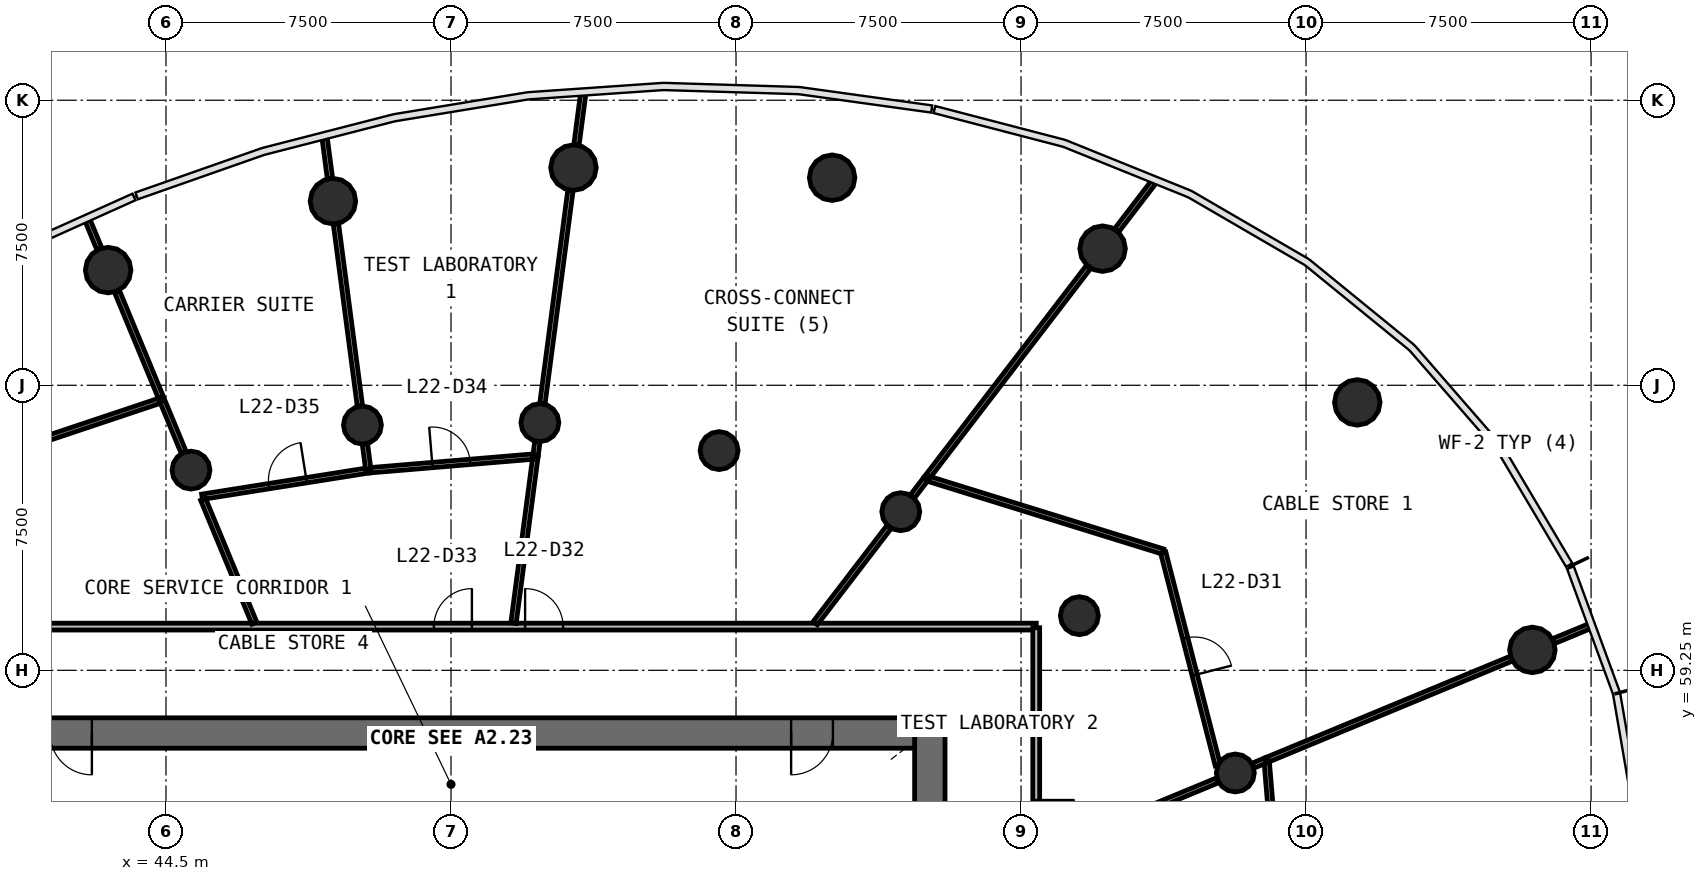
"""IFC4 building model, lengths in metres.
Left out: names, types, materials, properties, quantities, classifications, styles, units other than length and angle.
Written with IfcOpenShell. Run it as: python <this file> out.ifc"""

import sys

from ifc_helpers import new_model, si_unit, direction, frame, frame_2d, origin, origin_2d, place, context, subcontext, project, spatial, rectangle, circle, extrude, source, transform, mapped, element, fill, save


model = new_model("IFC4")
c1 = context("Model", 3, precision=1e-05, world=origin(), true_north=direction((0.0, 1.0)))
c2 = subcontext(c1, "Body", "Model", "MODEL_VIEW")
j1 = project(units=[si_unit("LENGTHUNIT", "METRE"), si_unit("PLANEANGLEUNIT", "RADIAN")], contexts=[c1])
p1 = place(None, origin())
s1 = spatial("IfcSite", under=j1, at=p1, CompositionType="ELEMENT")
p2 = place(p1, origin())
s2 = spatial("IfcBuilding", under=s1, at=p2, CompositionType="ELEMENT")
p3 = place(p2, frame((0.0, 0.0, 96.2)))
s3 = spatial("IfcBuildingStorey", under=s2, at=p3, CompositionType="ELEMENT", Elevation=96.2)
p4 = place(p3, frame((64.6, 38.0, 0.0), z_axis=(0.0, 0.0, 1.0), x_axis=(0.0, 1.0, 0.0)))
e1 = element("IfcWall", 1, at=p4, inside=s3, PredefinedType="SHEAR", context=c2, shape_type="SweptSolid", body=[
    extrude(rectangle(XDim=20.0, YDim=0.8, at=frame_2d((10.0, 0.0))), origin(), (0.0, 0.0, 1.0), 4.1),
])
p5 = place(p4, frame((9.1, 0.0, 0.0)))
e2 = element("IfcOpeningElement", 2, at=p5, cuts=e1, PredefinedType="OPENING", context=c2, shape_type="SweptSolid", body=[
    extrude(rectangle(XDim=1.8, YDim=2.1, at=frame_2d((0.9, 1.05))), frame((0.0, 0.41, 0.0), z_axis=(0.0, -1.0, 0.0), x_axis=(1.0, 0.0, 0.0)), (0.0, 0.0, 1.0), 0.82),
])
p6 = place(p3, frame((64.2, 57.6, 0.0), z_axis=(0.0, 0.0, 1.0), x_axis=(-1.0, 0.0, 0.0)))
e3 = element("IfcWall", 3, at=p6, inside=s3, PredefinedType="SHEAR", context=c2, shape_type="SweptSolid", body=[
    extrude(rectangle(XDim=24.4, YDim=0.8, at=frame_2d((12.2, 0.0))), origin(), (0.0, 0.0, 1.0), 4.1),
])
p7 = place(p6, frame((21.65, 0.0, 0.0)))
e4 = element("IfcOpeningElement", 4, at=p7, cuts=e3, PredefinedType="OPENING", context=c2, shape_type="SweptSolid", body=[
    extrude(rectangle(XDim=1.1, YDim=2.1, at=frame_2d((0.55, 1.05))), frame((0.0, 0.41, 0.0), z_axis=(0.0, -1.0, 0.0), x_axis=(1.0, 0.0, 0.0)), (0.0, 0.0, 1.0), 0.82),
])
p8 = place(p6, frame((2.15, 0.0, 0.0)))
e5 = element("IfcOpeningElement", 5, at=p8, cuts=e3, PredefinedType="OPENING", context=c2, shape_type="SweptSolid", body=[
    extrude(rectangle(XDim=1.1, YDim=2.1, at=frame_2d((0.55, 1.05))), frame((0.0, 0.41, 0.0), z_axis=(0.0, -1.0, 0.0), x_axis=(1.0, 0.0, 0.0)), (0.0, 0.0, 1.0), 0.82),
])
m1 = source(origin(), c2, "Body", "SweptSolid", [
    extrude(circle(Radius=0.6, at=origin_2d()), origin(), (0.0, 0.0, 1.0), 4.1),
])
for number, where, z_axis, x_axis in (
    (6, (80.456, 59.787, 0.0), (0.0, 0.0, 1.0), (1.0, 0.0, 0.0)),
    (7, (75.848, 66.299, 0.0), (0.0, 0.0, 1.0), (1.0, 0.0, 0.0)),
    (8, (69.146, 70.345, 0.0), (0.0, 0.0, 1.0), (1.0, 0.0, 0.0)),
    (9, (62.029, 72.212, 0.0), (0.0, 0.0, 1.0), (1.0, 0.0, 0.0)),
    (10, (55.222, 72.477, 0.0), (0.0, 0.0, 1.0), (1.0, 0.0, 0.0)),
    (11, (48.894, 71.595, 0.0), (0.0, 0.0, 1.0), (1.0, 0.0, 0.0)),
    (12, (42.978, 69.781, 0.0), (0.0, 0.0, 1.0), (1.0, 0.0, 0.0)),
):
    element("IfcColumn", number, at=place(p3, frame(where, z_axis=z_axis, x_axis=x_axis)), inside=s3, PredefinedType="COLUMN", context=c2, shape_type="MappedRepresentation", body=[
        mapped(m1, transform((0.0, 0.0, 0.0), scale=1.0)),
    ])
m2 = source(origin(), c2, "Body", "SweptSolid", [
    extrude(circle(Radius=0.5, at=origin_2d()), origin(), (0.0, 0.0, 1.0), 4.1),
])
for number, where, z_axis, x_axis in (
    (13, (72.639, 56.549, 0.0), (0.0, 0.0, 1.0), (1.0, 0.0, 0.0)),
    (14, (68.535, 60.688, 0.0), (0.0, 0.0, 1.0), (1.0, 0.0, 0.0)),
    (15, (63.835, 63.424, 0.0), (0.0, 0.0, 1.0), (1.0, 0.0, 0.0)),
    (16, (59.055, 65.031, 0.0), (0.0, 0.0, 1.0), (1.0, 0.0, 0.0)),
    (17, (54.339, 65.767, 0.0), (0.0, 0.0, 1.0), (1.0, 0.0, 0.0)),
    (18, (49.669, 65.703, 0.0), (0.0, 0.0, 1.0), (1.0, 0.0, 0.0)),
    (19, (45.158, 64.518, 0.0), (0.0, 0.0, 1.0), (1.0, 0.0, 0.0)),
):
    element("IfcColumn", number, at=place(p3, frame(where, z_axis=z_axis, x_axis=x_axis)), inside=s3, PredefinedType="COLUMN", context=c2, shape_type="MappedRepresentation", body=[
        mapped(m2, transform((0.0, 0.0, 0.0), scale=1.0)),
    ])
p9 = place(p3, frame((36.6, 60.4, 0.0), z_axis=(0.0, 0.0, 1.0), x_axis=(1.0, 0.0, 0.0)))
e20 = element("IfcWall", 20, at=p9, inside=s3, PredefinedType="PARTITIONING", context=c2, shape_type="SweptSolid", body=[
    extrude(rectangle(XDim=30.8, YDim=0.18, at=frame_2d((15.4, 0.0))), origin(), (0.0, 0.0, 1.0), 2.9),
])
p10 = place(p9, frame((17.35, 0.0, 0.0)))
e21 = element("IfcOpeningElement", 21, at=p10, cuts=e20, PredefinedType="OPENING", context=c2, shape_type="SweptSolid", body=[
    extrude(rectangle(XDim=1.0, YDim=2.1, at=frame_2d((0.5, 1.05))), frame((0.0, 0.1, 0.0), z_axis=(0.0, -1.0, 0.0), x_axis=(1.0, 0.0, 0.0)), (0.0, 0.0, 1.0), 0.2),
])
p11 = place(p9, frame((14.95, 0.0, 0.0)))
e22 = element("IfcOpeningElement", 22, at=p11, cuts=e20, PredefinedType="OPENING", context=c2, shape_type="SweptSolid", body=[
    extrude(rectangle(XDim=1.0, YDim=2.1, at=frame_2d((0.5, 1.05))), frame((0.0, 0.1, 0.0), z_axis=(0.0, -1.0, 0.0), x_axis=(1.0, 0.0, 0.0)), (0.0, 0.0, 1.0), 0.2),
])
p12 = place(p3, frame((67.4, 60.37, 0.0), z_axis=(0.0, 0.0, 1.0), x_axis=(0.0, -1.0, 0.0)))
e23 = element("IfcWall", 23, at=p12, inside=s3, PredefinedType="PARTITIONING", context=c2, shape_type="SweptSolid", body=[
    extrude(rectangle(XDim=23.583, YDim=0.18, at=frame_2d((11.791, 0.0))), origin(), (0.0, 0.0, 1.0), 2.9),
])
p13 = place(p12, frame((11.333, 0.0, 0.0)))
e24 = element("IfcOpeningElement", 24, at=p13, cuts=e23, PredefinedType="OPENING", context=c2, shape_type="SweptSolid", body=[
    extrude(rectangle(XDim=1.0, YDim=2.1, at=frame_2d((0.5, 1.05))), frame((0.0, 0.1, 0.0), z_axis=(0.0, -1.0, 0.0), x_axis=(1.0, 0.0, 0.0)), (0.0, 0.0, 1.0), 0.2),
])
p14 = place(p12, frame((4.532, 0.0, 0.0)))
e25 = element("IfcOpeningElement", 25, at=p14, cuts=e23, PredefinedType="OPENING", context=c2, shape_type="SweptSolid", body=[
    extrude(rectangle(XDim=1.0, YDim=2.1, at=frame_2d((0.5, 1.05))), frame((0.0, 0.1, 0.0), z_axis=(0.0, -1.0, 0.0), x_axis=(1.0, 0.0, 0.0)), (0.0, 0.0, 1.0), 0.2),
])
p15 = place(p3, frame((64.511, 64.305, 0.0), z_axis=(0.0, 0.0, 1.0), x_axis=(0.608747408716, 0.793364098244, 0.0)))
e26 = element("IfcWall", 26, at=p15, inside=s3, PredefinedType="PARTITIONING", context=c2, shape_type="SweptSolid", body=[
    extrude(rectangle(XDim=7.009, YDim=0.14, at=frame_2d((3.504, 0.0))), origin(), (0.0, 0.0, 1.0), 2.9),
])
p16 = place(p3, frame((73.461, 56.889, 0.0), z_axis=(0.0, 0.0, 1.0), x_axis=(0.923875437127, 0.382693319347, 0.0)))
e27 = element("IfcWall", 27, at=p16, inside=s3, PredefinedType="PARTITIONING", context=c2, shape_type="SweptSolid", body=[
    extrude(rectangle(XDim=6.966, YDim=0.14, at=frame_2d((3.483, 0.0))), origin(), (0.0, 0.0, 1.0), 2.9),
])
p17 = place(p3, frame((70.735, 62.375, 0.0), z_axis=(0.0, 0.0, 1.0), x_axis=(-0.955154002862, 0.296109491264, 0.0)))
e28 = element("IfcWall", 28, at=p17, inside=s3, PredefinedType="PARTITIONING", context=c2, shape_type="SweptSolid", body=[
    extrude(rectangle(XDim=6.441, YDim=0.14, at=frame_2d((3.22, 0.0))), origin(), (0.0, 0.0, 1.0), 2.9),
])
p18 = place(p3, frame((73.966, 50.892, 0.0), z_axis=(0.0, 0.0, 1.0), x_axis=(-0.083895623438, 0.996474547777, 0.0)))
e29 = element("IfcWall", 29, at=p18, inside=s3, PredefinedType="PARTITIONING", context=c2, shape_type="SweptSolid", body=[
    extrude(rectangle(XDim=5.989, YDim=0.14, at=frame_2d((2.994, 0.0))), origin(), (0.0, 0.0, 1.0), 2.9),
])
p19 = place(p3, frame((70.742, 62.346, 0.0), z_axis=(0.0, 0.0, 1.0), x_axis=(0.248578766965, -0.968611685153, 0.0)))
e30 = element("IfcWall", 30, at=p19, inside=s3, PredefinedType="PARTITIONING", context=c2, shape_type="SweptSolid", body=[
    extrude(rectangle(XDim=5.775, YDim=0.14, at=frame_2d((2.887, 0.0))), origin(), (0.0, 0.0, 1.0), 2.9),
])
p20 = place(p19, frame((2.325, 0.0, 0.0)))
e31 = element("IfcOpeningElement", 31, at=p20, cuts=e30, PredefinedType="OPENING", context=c2, shape_type="SweptSolid", body=[
    extrude(rectangle(XDim=1.0, YDim=2.1, at=frame_2d((0.5, 1.05))), frame((0.0, 0.08, 0.0), z_axis=(0.0, -1.0, 0.0), x_axis=(1.0, 0.0, 0.0)), (0.0, 0.0, 1.0), 0.16),
])
p21 = place(p3, frame((54.405, 66.267, 0.0), z_axis=(0.0, 0.0, 1.0), x_axis=(0.130510314557, 0.991446951578, 0.0)))
e32 = element("IfcWall", 32, at=p21, inside=s3, PredefinedType="PARTITIONING", context=c2, shape_type="SweptSolid", body=[
    extrude(rectangle(XDim=5.659, YDim=0.14, at=frame_2d((2.829, 0.0))), origin(), (0.0, 0.0, 1.0), 2.9),
])
p22 = place(p3, frame((44.394, 66.363, 0.0), z_axis=(0.0, 0.0, 1.0), x_axis=(-0.948344350496, -0.317242797999, 0.0)))
e33 = element("IfcWall", 33, at=p22, inside=s3, PredefinedType="PARTITIONING", context=c2, shape_type="SweptSolid", body=[
    extrude(rectangle(XDim=5.411, YDim=0.14, at=frame_2d((2.706, 0.0))), origin(), (0.0, 0.0, 1.0), 2.9),
])
p23 = place(p3, frame((67.49, 54.416, 0.0), z_axis=(0.0, 0.0, 1.0), x_axis=(0.923890025086, 0.382658100067, 0.0)))
e34 = element("IfcWall", 34, at=p23, inside=s3, PredefinedType="PARTITIONING", context=c2, shape_type="SweptSolid", body=[
    extrude(rectangle(XDim=5.068, YDim=0.14, at=frame_2d((2.534, 0.0))), origin(), (0.0, 0.0, 1.0), 2.9),
])
p24 = place(p3, frame((49.604, 66.203, 0.0), z_axis=(0.0, 0.0, 1.0), x_axis=(-0.130552494248, 0.991441398291, 0.0)))
e35 = element("IfcWall", 35, at=p24, inside=s3, PredefinedType="PARTITIONING", context=c2, shape_type="SweptSolid", body=[
    extrude(rectangle(XDim=4.834, YDim=0.14, at=frame_2d((2.417, 0.0))), origin(), (0.0, 0.0, 1.0), 2.9),
])
p25 = place(p3, frame((53.644, 60.49, 0.0), z_axis=(0.0, 0.0, 1.0), x_axis=(0.130541536681, 0.991442841116, 0.0)))
e36 = element("IfcWall", 36, at=p25, inside=s3, PredefinedType="PARTITIONING", context=c2, shape_type="SweptSolid", body=[
    extrude(rectangle(XDim=4.427, YDim=0.14, at=frame_2d((2.213, 0.0))), origin(), (0.0, 0.0, 1.0), 2.9),
])
p26 = place(p3, frame((45.448, 63.816, 0.0), z_axis=(0.0, 0.0, 1.0), x_axis=(0.987681104019, 0.156480148144, 0.0)))
e37 = element("IfcWall", 37, at=p26, inside=s3, PredefinedType="PARTITIONING", context=c2, shape_type="SweptSolid", body=[
    extrude(rectangle(XDim=4.433, YDim=0.14, at=frame_2d((2.216, 0.0))), origin(), (0.0, 0.0, 1.0), 2.9),
])
p27 = place(p26, frame((1.782, 0.0, 0.0)))
e38 = element("IfcOpeningElement", 38, at=p27, cuts=e37, PredefinedType="OPENING", context=c2, shape_type="SweptSolid", body=[
    extrude(rectangle(XDim=1.0, YDim=2.1, at=frame_2d((0.5, 1.05))), frame((0.0, 0.08, 0.0), z_axis=(0.0, -1.0, 0.0), x_axis=(1.0, 0.0, 0.0)), (0.0, 0.0, 1.0), 0.16),
])
p28 = place(p3, frame((49.856, 64.513, 0.0), z_axis=(0.0, 0.0, 1.0), x_axis=(0.996498324855, 0.083612729662, 0.0)))
e39 = element("IfcWall", 39, at=p28, inside=s3, PredefinedType="PARTITIONING", context=c2, shape_type="SweptSolid", body=[
    extrude(rectangle(XDim=4.31, YDim=0.14, at=frame_2d((2.155, 0.0))), origin(), (0.0, 0.0, 1.0), 2.9),
])
p29 = place(p28, frame((1.66, 0.0, 0.0)))
e40 = element("IfcOpeningElement", 40, at=p29, cuts=e39, PredefinedType="OPENING", context=c2, shape_type="SweptSolid", body=[
    extrude(rectangle(XDim=1.0, YDim=2.1, at=frame_2d((0.5, 1.05))), frame((0.0, 0.08, 0.0), z_axis=(0.0, -1.0, 0.0), x_axis=(1.0, 0.0, 0.0)), (0.0, 0.0, 1.0), 0.16),
])
p30 = place(p3, frame((46.826, 60.49, 0.0), z_axis=(0.0, 0.0, 1.0), x_axis=(-0.382624745771, 0.923903839111, 0.0)))
e41 = element("IfcWall", 41, at=p30, inside=s3, PredefinedType="PARTITIONING", context=c2, shape_type="SweptSolid", body=[
    extrude(rectangle(XDim=3.529, YDim=0.14, at=frame_2d((1.764, 0.0))), origin(), (0.0, 0.0, 1.0), 2.9),
])
p31 = place(p3, frame((61.584, 60.49, 0.0), z_axis=(0.0, 0.0, 1.0), x_axis=(0.60874605662, 0.793365135703, 0.0)))
e42 = element("IfcWall", 42, at=p31, inside=s3, PredefinedType="PARTITIONING", context=c2, shape_type="SweptSolid", body=[
    extrude(rectangle(XDim=3.194, YDim=0.14, at=frame_2d((1.597, 0.0))), origin(), (0.0, 0.0, 1.0), 2.9),
])
p32 = place(p3, frame((44.367, 66.428, 0.0), z_axis=(0.0, 0.0, 1.0), x_axis=(-0.382653687311, 0.923891852755, 0.0)))
e43 = element("IfcWall", 43, at=p32, inside=s3, PredefinedType="PARTITIONING", context=c2, shape_type="SweptSolid", body=[
    extrude(rectangle(XDim=3.024, YDim=0.14, at=frame_2d((1.512, 0.0))), origin(), (0.0, 0.0, 1.0), 2.9),
])
p33 = place(p3, frame((69.514, 70.824, 0.0), z_axis=(0.0, 0.0, 1.0), x_axis=(0.608843265378, 0.79329053833, 0.0)))
e44 = element("IfcWall", 44, at=p33, inside=s3, PredefinedType="PARTITIONING", context=c2, shape_type="SweptSolid", body=[
    extrude(rectangle(XDim=1.605, YDim=0.14, at=frame_2d((0.803, 0.0))), origin(), (0.0, 0.0, 1.0), 2.9),
])
p34 = place(p3, frame((44.965, 64.984, 0.0), z_axis=(0.0, 0.0, 1.0), x_axis=(-0.382813576456, 0.923825614324, 0.0)))
e45 = element("IfcWall", 45, at=p34, inside=s3, PredefinedType="PARTITIONING", context=c2, shape_type="SweptSolid", body=[
    extrude(rectangle(XDim=1.463, YDim=0.14, at=frame_2d((0.731, 0.0))), origin(), (0.0, 0.0, 1.0), 2.9),
])
p35 = place(p3, frame((55.301, 73.076, 0.0), z_axis=(0.0, 0.0, 1.0), x_axis=(0.130459252334, 0.991453671878, 0.0)))
e46 = element("IfcWall", 46, at=p35, inside=s3, PredefinedType="PARTITIONING", context=c2, shape_type="SweptSolid", body=[
    extrude(rectangle(XDim=1.333, YDim=0.14, at=frame_2d((0.666, 0.0))), origin(), (0.0, 0.0, 1.0), 2.9),
])
p36 = place(p3, frame((48.815, 72.195, 0.0), z_axis=(0.0, 0.0, 1.0), x_axis=(-0.130532066482, 0.991444087995, 0.0)))
e47 = element("IfcWall", 47, at=p36, inside=s3, PredefinedType="PARTITIONING", context=c2, shape_type="SweptSolid", body=[
    extrude(rectangle(XDim=1.059, YDim=0.14, at=frame_2d((0.529, 0.0))), origin(), (0.0, 0.0, 1.0), 2.9),
])
p37 = place(p3, frame((81.014, 60.018, 0.0), z_axis=(0.0, 0.0, 1.0), x_axis=(0.923912211219, 0.382604529457, 0.0)))
e48 = element("IfcWall", 48, at=p37, inside=s3, PredefinedType="PARTITIONING", context=c2, shape_type="SweptSolid", body=[
    extrude(rectangle(XDim=1.052, YDim=0.14, at=frame_2d((0.526, 0.0))), origin(), (0.0, 0.0, 1.0), 2.9),
])
p38 = place(p3, frame((42.747, 70.34, 0.0), z_axis=(0.0, 0.0, 1.0), x_axis=(-0.382766463222, 0.923845135633, 0.0)))
e49 = element("IfcWall", 49, at=p38, inside=s3, PredefinedType="PARTITIONING", context=c2, shape_type="SweptSolid", body=[
    extrude(rectangle(XDim=0.797, YDim=0.14, at=frame_2d((0.399, 0.0))), origin(), (0.0, 0.0, 1.0), 2.9),
])
p39 = place(p3, frame((49.823, 64.54, 0.0), z_axis=(0.0, 0.0, 1.0), x_axis=(-0.13063385496, 0.991430681358, 0.0)))
e50 = element("IfcWall", 50, at=p39, inside=s3, PredefinedType="PARTITIONING", context=c2, shape_type="SweptSolid", body=[
    extrude(rectangle(XDim=0.669, YDim=0.14, at=frame_2d((0.334, 0.0))), origin(), (0.0, 0.0, 1.0), 2.9),
])
p40 = place(p3, frame((64.142, 63.824, 0.0), z_axis=(0.0, 0.0, 1.0), x_axis=(0.608911807211, 0.793237928392, 0.0)))
e51 = element("IfcWall", 51, at=p40, inside=s3, PredefinedType="PARTITIONING", context=c2, shape_type="SweptSolid", body=[
    extrude(rectangle(XDim=0.576, YDim=0.14, at=frame_2d((0.288, 0.0))), origin(), (0.0, 0.0, 1.0), 2.9),
])
p41 = place(p3, frame((54.226, 64.909, 0.0), z_axis=(0.0, 0.0, 1.0), x_axis=(0.130349686634, 0.991468082792, 0.0)))
e52 = element("IfcWall", 52, at=p41, inside=s3, PredefinedType="PARTITIONING", context=c2, shape_type="SweptSolid", body=[
    extrude(rectangle(XDim=0.362, YDim=0.14, at=frame_2d((0.181, 0.0))), origin(), (0.0, 0.0, 1.0), 2.9),
])
p42 = place(p3, frame((73.106, 56.742, 0.0), z_axis=(0.0, 0.0, 1.0), x_axis=(0.923646914224, 0.383244540529, 0.0)))
e53 = element("IfcWall", 53, at=p42, inside=s3, PredefinedType="PARTITIONING", context=c2, shape_type="SweptSolid", body=[
    extrude(rectangle(XDim=0.354, YDim=0.14, at=frame_2d((0.177, 0.0))), origin(), (0.0, 0.0, 1.0), 2.9),
])
m3 = source(origin(), c2, "Body", "SweptSolid", [
    extrude(rectangle(XDim=1.1, YDim=2.1, at=frame_2d((0.55, 1.05))), frame((0.0, 0.025, 0.0), z_axis=(0.0, -1.0, 0.0), x_axis=(1.0, 0.0, 0.0)), (0.0, 0.0, 1.0), 0.05),
])
p43 = place(p7, origin())
e54 = element("IfcDoor", 54, at=p43, inside=s3, OperationType="SINGLE_SWING_LEFT", PredefinedType="DOOR", context=c2, shape_type="MappedRepresentation", body=[
    mapped(m3, transform((0.0, 0.0, 0.0), scale=1.0)),
])
fill(e4, e54)
p44 = place(p8, origin())
e55 = element("IfcDoor", 55, at=p44, inside=s3, OperationType="SINGLE_SWING_RIGHT", PredefinedType="DOOR", context=c2, shape_type="MappedRepresentation", body=[
    mapped(m3, transform((0.0, 0.0, 0.0), scale=1.0)),
])
fill(e5, e55)
m4 = source(origin(), c2, "Body", "SweptSolid", [
    extrude(rectangle(XDim=1.0, YDim=2.1, at=frame_2d((0.5, 1.05))), frame((0.0, 0.025, 0.0), z_axis=(0.0, -1.0, 0.0), x_axis=(1.0, 0.0, 0.0)), (0.0, 0.0, 1.0), 0.05),
])
p45 = place(p14, origin())
e56 = element("IfcDoor", 56, at=p45, inside=s3, OperationType="SINGLE_SWING_LEFT", PredefinedType="DOOR", context=c2, shape_type="MappedRepresentation", body=[
    mapped(m4, transform((0.0, 0.0, 0.0), scale=1.0)),
])
fill(e25, e56)
p46 = place(p20, origin())
e57 = element("IfcDoor", 57, at=p46, inside=s3, OperationType="SINGLE_SWING_RIGHT", PredefinedType="DOOR", context=c2, shape_type="MappedRepresentation", body=[
    mapped(m4, transform((0.0, 0.0, 0.0), scale=1.0)),
])
fill(e31, e57)
p47 = place(p10, origin())
e58 = element("IfcDoor", 58, at=p47, inside=s3, OperationType="SINGLE_SWING_LEFT", PredefinedType="DOOR", context=c2, shape_type="MappedRepresentation", body=[
    mapped(m4, transform((0.0, 0.0, 0.0), scale=1.0)),
])
fill(e21, e58)
p48 = place(p11, origin())
e59 = element("IfcDoor", 59, at=p48, inside=s3, OperationType="SINGLE_SWING_RIGHT", PredefinedType="DOOR", context=c2, shape_type="MappedRepresentation", body=[
    mapped(m4, transform((0.0, 0.0, 0.0), scale=1.0)),
])
fill(e22, e59)
p49 = place(p29, origin())
e60 = element("IfcDoor", 60, at=p49, inside=s3, OperationType="SINGLE_SWING_LEFT", PredefinedType="DOOR", context=c2, shape_type="MappedRepresentation", body=[
    mapped(m4, transform((0.0, 0.0, 0.0), scale=1.0)),
])
fill(e40, e60)
p50 = place(p27, origin())
e61 = element("IfcDoor", 61, at=p50, inside=s3, OperationType="SINGLE_SWING_RIGHT", PredefinedType="DOOR", context=c2, shape_type="MappedRepresentation", body=[
    mapped(m4, transform((0.0, 0.0, 0.0), scale=1.0)),
])
fill(e38, e61)
save(model, sys.argv[1])
